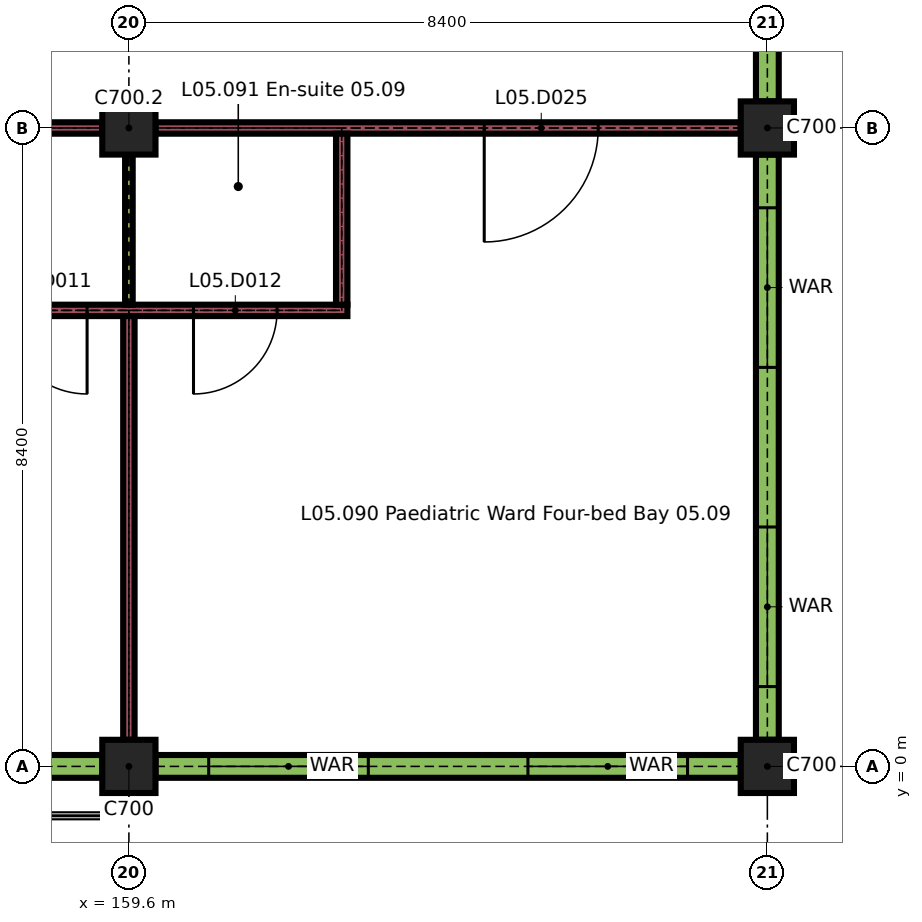
"""IFC4 building model, lengths in metres.
Left out: names, types, materials, properties, quantities, classifications, styles, units other than length and angle.
Written with IfcOpenShell. Run it as: python <this file> out.ifc"""

import sys

from ifc_helpers import new_model, si_unit, direction, frame, frame_2d, origin, origin_2d, place, context, subcontext, project, spatial, rectangle, extrude, element, fill, save


model = new_model("IFC4")
c1 = context("Model", 3, precision=1e-05, world=origin(), true_north=direction((0.0, 1.0)))
c2 = subcontext(c1, "Body", "Model", "MODEL_VIEW")
j1 = project(units=[si_unit("LENGTHUNIT", "METRE"), si_unit("PLANEANGLEUNIT", "RADIAN")], contexts=[c1])
p1 = place(None, origin())
s1 = spatial("IfcSite", under=j1, at=p1, CompositionType="ELEMENT")
p2 = place(p1, origin())
s2 = spatial("IfcBuilding", under=s1, at=p2, CompositionType="ELEMENT")
p3 = place(p2, frame((0.0, 0.0, 22.5)))
s3 = spatial("IfcBuildingStorey", under=s2, at=p3, CompositionType="ELEMENT", Elevation=22.5)
for number, where, z_axis, x_axis in (
    (1, (159.6, 0.0, 0.0), (0.0, 0.0, 1.0), (1.0, 0.0, 0.0)),
    (2, (168.0, 0.0, 0.0), (0.0, 0.0, 1.0), (1.0, 0.0, 0.0)),
    (3, (159.6, 8.4, 0.0), (0.0, 0.0, 1.0), (1.0, 0.0, 0.0)),
    (4, (168.0, 8.4, 0.0), (0.0, 0.0, 1.0), (1.0, 0.0, 0.0)),
):
    element("IfcColumn", number, at=place(p3, frame(where, z_axis=z_axis, x_axis=x_axis)), inside=s3, PredefinedType="COLUMN", context=c2, shape_type="SweptSolid", body=[
        extrude(rectangle(XDim=0.7, YDim=0.7, at=origin_2d()), origin(), (0.0, 0.0, 1.0), 3.26),
    ])
p4 = place(p3, frame((155.4, 0.0, 0.0), z_axis=(0.0, 0.0, 1.0), x_axis=(1.0, 0.0, 0.0)))
e5 = element("IfcWall", 5, at=p4, inside=s3, PredefinedType="SOLIDWALL", context=c2, shape_type="SweptSolid", body=[
    extrude(rectangle(XDim=3.85, YDim=0.3, at=frame_2d((1.925, 0.0))), origin(), (0.0, 0.0, 1.0), 2.96),
])
p5 = place(p4, frame((1.05, 0.0, 0.9)))
e6 = element("IfcOpeningElement", 6, at=p5, cuts=e5, PredefinedType="OPENING", context=c2, shape_type="SweptSolid", body=[
    extrude(rectangle(XDim=2.1, YDim=1.5, at=frame_2d((1.05, 0.75))), frame((0.0, 0.16, 0.0), z_axis=(0.0, -1.0, 0.0), x_axis=(1.0, 0.0, 0.0)), (0.0, 0.0, 1.0), 0.32),
])
p6 = place(p3, frame((159.95, 0.0, 0.0), z_axis=(0.0, 0.0, 1.0), x_axis=(1.0, 0.0, 0.0)))
e7 = element("IfcWall", 7, at=p6, inside=s3, PredefinedType="SOLIDWALL", context=c2, shape_type="SweptSolid", body=[
    extrude(rectangle(XDim=7.7, YDim=0.3, at=frame_2d((3.85, 0.0))), origin(), (0.0, 0.0, 1.0), 2.96),
])
p7 = place(p6, frame((0.7, 0.0, 0.9)))
e8 = element("IfcOpeningElement", 8, at=p7, cuts=e7, PredefinedType="OPENING", context=c2, shape_type="SweptSolid", body=[
    extrude(rectangle(XDim=2.1, YDim=1.5, at=frame_2d((1.05, 0.75))), frame((0.0, 0.16, 0.0), z_axis=(0.0, -1.0, 0.0), x_axis=(1.0, 0.0, 0.0)), (0.0, 0.0, 1.0), 0.32),
])
p8 = place(p6, frame((4.9, 0.0, 0.9)))
e9 = element("IfcOpeningElement", 9, at=p8, cuts=e7, PredefinedType="OPENING", context=c2, shape_type="SweptSolid", body=[
    extrude(rectangle(XDim=2.1, YDim=1.5, at=frame_2d((1.05, 0.75))), frame((0.0, 0.16, 0.0), z_axis=(0.0, -1.0, 0.0), x_axis=(1.0, 0.0, 0.0)), (0.0, 0.0, 1.0), 0.32),
])
p9 = place(p3, frame((168.0, 0.35, 0.0), z_axis=(0.0, 0.0, 1.0), x_axis=(0.0, 1.0, 0.0)))
e10 = element("IfcWall", 10, at=p9, inside=s3, PredefinedType="SOLIDWALL", context=c2, shape_type="SweptSolid", body=[
    extrude(rectangle(XDim=7.7, YDim=0.3, at=frame_2d((3.85, 0.0))), origin(), (0.0, 0.0, 1.0), 2.96),
])
p10 = place(p9, frame((0.7, 0.0, 0.9)))
e11 = element("IfcOpeningElement", 11, at=p10, cuts=e10, PredefinedType="OPENING", context=c2, shape_type="SweptSolid", body=[
    extrude(rectangle(XDim=2.1, YDim=1.5, at=frame_2d((1.05, 0.75))), frame((0.0, 0.16, 0.0), z_axis=(0.0, -1.0, 0.0), x_axis=(1.0, 0.0, 0.0)), (0.0, 0.0, 1.0), 0.32),
])
p11 = place(p9, frame((4.9, 0.0, 0.9)))
e12 = element("IfcOpeningElement", 12, at=p11, cuts=e10, PredefinedType="OPENING", context=c2, shape_type="SweptSolid", body=[
    extrude(rectangle(XDim=2.1, YDim=1.5, at=frame_2d((1.05, 0.75))), frame((0.0, 0.16, 0.0), z_axis=(0.0, -1.0, 0.0), x_axis=(1.0, 0.0, 0.0)), (0.0, 0.0, 1.0), 0.32),
])
p12 = place(p3, frame((168.0, 8.75, 0.0), z_axis=(0.0, 0.0, 1.0), x_axis=(0.0, 1.0, 0.0)))
e13 = element("IfcWall", 13, at=p12, inside=s3, PredefinedType="SOLIDWALL", context=c2, shape_type="SweptSolid", body=[
    extrude(rectangle(XDim=2.65, YDim=0.3, at=frame_2d((1.325, 0.0))), origin(), (0.0, 0.0, 1.0), 2.96),
])
p13 = place(p12, frame((1.3, 0.0, 0.9)))
e14 = element("IfcOpeningElement", 14, at=p13, cuts=e13, PredefinedType="OPENING", context=c2, shape_type="SweptSolid", body=[
    extrude(rectangle(XDim=0.9, YDim=1.5, at=frame_2d((0.45, 0.75))), frame((0.0, 0.16, 0.0), z_axis=(0.0, -1.0, 0.0), x_axis=(1.0, 0.0, 0.0)), (0.0, 0.0, 1.0), 0.32),
])
p14 = place(p3, frame((157.325, 6.0, 0.0), z_axis=(0.0, 0.0, 1.0), x_axis=(1.0, 0.0, 0.0)))
e15 = element("IfcWall", 15, at=p14, inside=s3, PredefinedType="PARTITIONING", context=c2, shape_type="SweptSolid", body=[
    extrude(rectangle(XDim=5.15, YDim=0.15, at=frame_2d((2.575, 0.0))), origin(), (0.0, 0.0, 1.0), 3.26),
])
p15 = place(p14, frame((0.625, 0.0, 0.0)))
e16 = element("IfcOpeningElement", 16, at=p15, cuts=e15, PredefinedType="OPENING", context=c2, shape_type="SweptSolid", body=[
    extrude(rectangle(XDim=1.1, YDim=2.1, at=frame_2d((0.55, 1.05))), frame((0.0, 0.085, 0.0), z_axis=(0.0, -1.0, 0.0), x_axis=(1.0, 0.0, 0.0)), (0.0, 0.0, 1.0), 0.17),
])
p16 = place(p14, frame((3.125, 0.0, 0.0)))
e17 = element("IfcOpeningElement", 17, at=p16, cuts=e15, PredefinedType="OPENING", context=c2, shape_type="SweptSolid", body=[
    extrude(rectangle(XDim=1.1, YDim=2.1, at=frame_2d((0.55, 1.05))), frame((0.0, 0.085, 0.0), z_axis=(0.0, -1.0, 0.0), x_axis=(1.0, 0.0, 0.0)), (0.0, 0.0, 1.0), 0.17),
])
p17 = place(p3, frame((155.325, 8.4, 0.0), z_axis=(0.0, 0.0, 1.0), x_axis=(1.0, 0.0, 0.0)))
e18 = element("IfcWall", 18, at=p17, inside=s3, PredefinedType="PARTITIONING", context=c2, shape_type="SweptSolid", body=[
    extrude(rectangle(XDim=3.925, YDim=0.15, at=frame_2d((1.962, 0.0))), origin(), (0.0, 0.0, 1.0), 3.26),
])
p18 = place(p17, frame((0.325, 0.0, 0.0)))
e19 = element("IfcOpeningElement", 19, at=p18, cuts=e18, PredefinedType="OPENING", context=c2, shape_type="SweptSolid", body=[
    extrude(rectangle(XDim=1.5, YDim=2.4, at=frame_2d((0.75, 1.2))), frame((0.0, 0.085, 0.0), z_axis=(0.0, -1.0, 0.0), x_axis=(1.0, 0.0, 0.0)), (0.0, 0.0, 1.0), 0.17),
])
p19 = place(p3, frame((159.95, 8.4, 0.0), z_axis=(0.0, 0.0, 1.0), x_axis=(1.0, 0.0, 0.0)))
e20 = element("IfcWall", 20, at=p19, inside=s3, PredefinedType="PARTITIONING", context=c2, shape_type="SweptSolid", body=[
    extrude(rectangle(XDim=7.7, YDim=0.15, at=frame_2d((3.85, 0.0))), origin(), (0.0, 0.0, 1.0), 3.26),
])
p20 = place(p19, frame((4.325, 0.0, 0.0)))
e21 = element("IfcOpeningElement", 21, at=p20, cuts=e20, PredefinedType="OPENING", context=c2, shape_type="SweptSolid", body=[
    extrude(rectangle(XDim=1.5, YDim=2.4, at=frame_2d((0.75, 1.2))), frame((0.0, 0.085, 0.0), z_axis=(0.0, -1.0, 0.0), x_axis=(1.0, 0.0, 0.0)), (0.0, 0.0, 1.0), 0.17),
])
p21 = place(p3, frame((159.6, 0.35, 0.0), z_axis=(0.0, 0.0, 1.0), x_axis=(0.0, 1.0, 0.0)))
e22 = element("IfcWall", 22, at=p21, inside=s3, PredefinedType="PARTITIONING", context=c2, shape_type="SweptSolid", body=[
    extrude(rectangle(XDim=5.575, YDim=0.15, at=frame_2d((2.788, 0.0))), origin(), (0.0, 0.0, 1.0), 3.26),
])
p22 = place(p3, frame((159.6, 6.075, 0.0), z_axis=(0.0, 0.0, 1.0), x_axis=(0.0, 1.0, 0.0)))
e23 = element("IfcWall", 23, at=p22, inside=s3, PredefinedType="PARTITIONING", context=c2, shape_type="SweptSolid", body=[
    extrude(rectangle(XDim=1.975, YDim=0.1, at=frame_2d((0.988, 0.0))), origin(), (0.0, 0.0, 1.0), 3.26),
])
p23 = place(p3, frame((162.4, 6.075, 0.0), z_axis=(0.0, 0.0, 1.0), x_axis=(0.0, 1.0, 0.0)))
e24 = element("IfcWall", 24, at=p23, inside=s3, PredefinedType="PARTITIONING", context=c2, shape_type="SweptSolid", body=[
    extrude(rectangle(XDim=2.25, YDim=0.15, at=frame_2d((1.125, 0.0))), origin(), (0.0, 0.0, 1.0), 3.26),
])
p24 = place(p7, origin())
e25 = element("IfcWindow", 25, at=p24, inside=s3, PartitioningType="DOUBLE_PANEL_VERTICAL", PredefinedType="WINDOW", context=c2, shape_type="SweptSolid", body=[
    extrude(rectangle(XDim=2.1, YDim=1.5, at=frame_2d((1.05, 0.75))), frame((0.0, 0.05, 0.0), z_axis=(0.0, -1.0, 0.0), x_axis=(1.0, 0.0, 0.0)), (0.0, 0.0, 1.0), 0.1),
])
fill(e8, e25)
p25 = place(p8, origin())
e26 = element("IfcWindow", 26, at=p25, inside=s3, PartitioningType="DOUBLE_PANEL_VERTICAL", PredefinedType="WINDOW", context=c2, shape_type="SweptSolid", body=[
    extrude(rectangle(XDim=2.1, YDim=1.5, at=frame_2d((1.05, 0.75))), frame((0.0, 0.05, 0.0), z_axis=(0.0, -1.0, 0.0), x_axis=(1.0, 0.0, 0.0)), (0.0, 0.0, 1.0), 0.1),
])
fill(e9, e26)
p26 = place(p10, origin())
e27 = element("IfcWindow", 27, at=p26, inside=s3, PartitioningType="DOUBLE_PANEL_VERTICAL", PredefinedType="WINDOW", context=c2, shape_type="SweptSolid", body=[
    extrude(rectangle(XDim=2.1, YDim=1.5, at=frame_2d((1.05, 0.75))), frame((0.0, 0.05, 0.0), z_axis=(0.0, -1.0, 0.0), x_axis=(1.0, 0.0, 0.0)), (0.0, 0.0, 1.0), 0.1),
])
fill(e11, e27)
p27 = place(p11, origin())
e28 = element("IfcWindow", 28, at=p27, inside=s3, PartitioningType="DOUBLE_PANEL_VERTICAL", PredefinedType="WINDOW", context=c2, shape_type="SweptSolid", body=[
    extrude(rectangle(XDim=2.1, YDim=1.5, at=frame_2d((1.05, 0.75))), frame((0.0, 0.05, 0.0), z_axis=(0.0, -1.0, 0.0), x_axis=(1.0, 0.0, 0.0)), (0.0, 0.0, 1.0), 0.1),
])
fill(e12, e28)
p28 = place(p15, origin())
e29 = element("IfcDoor", 29, at=p28, inside=s3, OperationType="SINGLE_SWING_RIGHT", PredefinedType="DOOR", context=c2, shape_type="SweptSolid", body=[
    extrude(rectangle(XDim=1.1, YDim=2.1, at=frame_2d((0.55, 1.05))), frame((0.0, 0.025, 0.0), z_axis=(0.0, -1.0, 0.0), x_axis=(1.0, 0.0, 0.0)), (0.0, 0.0, 1.0), 0.05),
])
fill(e16, e29)
p29 = place(p16, origin())
e30 = element("IfcDoor", 30, at=p29, inside=s3, OperationType="SINGLE_SWING_LEFT", PredefinedType="DOOR", context=c2, shape_type="SweptSolid", body=[
    extrude(rectangle(XDim=1.1, YDim=2.1, at=frame_2d((0.55, 1.05))), frame((0.0, 0.025, 0.0), z_axis=(0.0, -1.0, 0.0), x_axis=(1.0, 0.0, 0.0)), (0.0, 0.0, 1.0), 0.05),
])
fill(e17, e30)
p30 = place(p20, origin())
e31 = element("IfcDoor", 31, at=p30, inside=s3, OperationType="SINGLE_SWING_LEFT", PredefinedType="DOOR", context=c2, shape_type="SweptSolid", body=[
    extrude(rectangle(XDim=1.5, YDim=2.4, at=frame_2d((0.75, 1.2))), frame((0.0, 0.03, 0.0), z_axis=(0.0, -1.0, 0.0), x_axis=(1.0, 0.0, 0.0)), (0.0, 0.0, 1.0), 0.06),
])
fill(e21, e31)
save(model, sys.argv[1])
